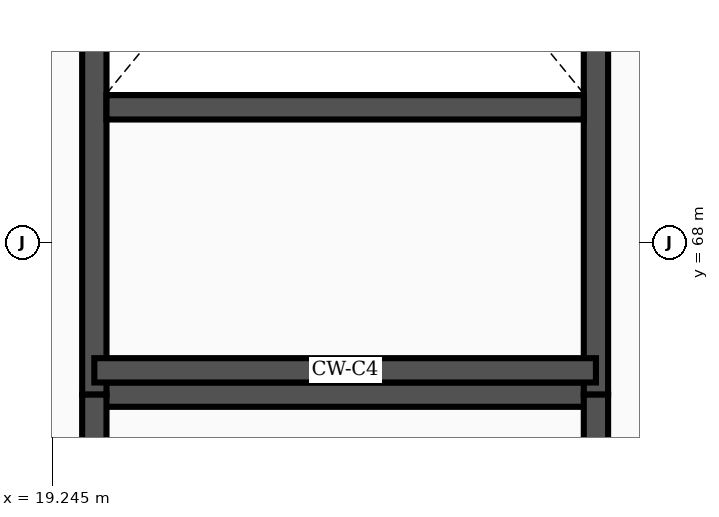
"""IFC4 building model, lengths in metres.
Left out: names, types, materials, properties, quantities, classifications, styles, units other than length and angle.
Written with IfcOpenShell. Run it as: python <this file> out.ifc"""

import sys

from ifc_helpers import new_model, si_unit, direction, frame, frame_2d, origin, place, context, subcontext, project, spatial, rectangle, extrude, element, save


model = new_model("IFC4")
c1 = context("Model", 3, precision=1e-05, world=origin(), true_north=direction((0.0, 1.0)))
c2 = subcontext(c1, "Body", "Model", "MODEL_VIEW")
j1 = project(units=[si_unit("LENGTHUNIT", "METRE"), si_unit("PLANEANGLEUNIT", "RADIAN")], contexts=[c1])
p1 = place(None, origin())
s1 = spatial("IfcSite", under=j1, at=p1, CompositionType="ELEMENT")
p2 = place(p1, origin())
s2 = spatial("IfcBuilding", under=s1, at=p2, CompositionType="ELEMENT")
p3 = place(p2, frame((0.0, 0.0, 6.0)))
s3 = spatial("IfcBuildingStorey", under=s2, at=p3, CompositionType="ELEMENT", Elevation=6.0)
p4 = place(p3, frame((19.8, 66.0, 0.0), z_axis=(0.0, 0.0, 1.0), x_axis=(1.0, 0.0, 0.0)))
e1 = element("IfcWall", 1, at=p4, inside=s3, PredefinedType="SHEAR", context=c2, shape_type="SweptSolid", body=[
    extrude(rectangle(XDim=6.6, YDim=0.32, at=frame_2d((3.3, 0.0))), origin(), (0.0, 0.0, 1.0), 5.15),
])
p5 = place(p3, frame((19.8, 66.0, 0.0), z_axis=(0.0, 0.0, 1.0), x_axis=(0.0, 1.0, 0.0)))
e2 = element("IfcWall", 2, at=p5, inside=s3, PredefinedType="SHEAR", context=c2, shape_type="SweptSolid", body=[
    extrude(rectangle(XDim=14.6, YDim=0.32, at=frame_2d((7.3, 0.0))), origin(), (0.0, 0.0, 1.0), 5.15),
])
p6 = place(p5, frame((11.65, 0.0, 0.0)))
e3 = element("IfcOpeningElement", 3, at=p6, cuts=e2, PredefinedType="OPENING", context=c2, shape_type="SweptSolid", body=[
    extrude(rectangle(XDim=2.4, YDim=2.25, at=frame_2d((1.2, 1.125))), frame((0.0, 0.172, 0.0), z_axis=(0.0, -1.0, 0.0), x_axis=(1.0, 0.0, 0.0)), (0.0, 0.0, 1.0), 0.344),
])
p7 = place(p3, frame((26.4, 66.0, 0.0), z_axis=(0.0, 0.0, 1.0), x_axis=(0.0, 1.0, 0.0)))
e4 = element("IfcWall", 4, at=p7, inside=s3, PredefinedType="SHEAR", context=c2, shape_type="SweptSolid", body=[
    extrude(rectangle(XDim=14.6, YDim=0.32, at=frame_2d((7.3, 0.0))), origin(), (0.0, 0.0, 1.0), 5.15),
])
p8 = place(p3, frame((19.96, 69.78, 0.0), z_axis=(0.0, 0.0, 1.0), x_axis=(1.0, 0.0, 0.0)))
e5 = element("IfcWall", 5, at=p8, inside=s3, PredefinedType="SHEAR", context=c2, shape_type="SweptSolid", body=[
    extrude(rectangle(XDim=6.28, YDim=0.32, at=frame_2d((3.14, 0.0))), origin(), (0.0, 0.0, 1.0), 5.15),
])
p9 = place(p3, frame((19.8, 66.32, 0.0), z_axis=(0.0, 0.0, 1.0), x_axis=(1.0, 0.0, 0.0)))
e6 = element("IfcWall", 6, at=p9, inside=s3, PredefinedType="SHEAR", context=c2, shape_type="SweptSolid", body=[
    extrude(rectangle(XDim=6.6, YDim=0.32, at=frame_2d((3.3, 0.0))), origin(), (0.0, 0.0, 1.0), 5.15),
])
p10 = place(p3, frame((19.8, 54.0, 0.0), z_axis=(0.0, 0.0, 1.0), x_axis=(0.0, 1.0, 0.0)))
e7 = element("IfcWall", 7, at=p10, inside=s3, PredefinedType="SHEAR", context=c2, shape_type="SweptSolid", body=[
    extrude(rectangle(XDim=12.0, YDim=0.32, at=frame_2d((6.0, 0.0))), origin(), (0.0, 0.0, 1.0), 5.15),
])
p11 = place(p10, frame((0.55, 0.0, 0.0)))
e8 = element("IfcOpeningElement", 8, at=p11, cuts=e7, PredefinedType="OPENING", context=c2, shape_type="SweptSolid", body=[
    extrude(rectangle(XDim=2.4, YDim=2.25, at=frame_2d((1.2, 1.125))), frame((0.0, 0.172, 0.0), z_axis=(0.0, -1.0, 0.0), x_axis=(1.0, 0.0, 0.0)), (0.0, 0.0, 1.0), 0.344),
])
p12 = place(p3, frame((26.4, 54.0, 0.0), z_axis=(0.0, 0.0, 1.0), x_axis=(0.0, 1.0, 0.0)))
e9 = element("IfcWall", 9, at=p12, inside=s3, PredefinedType="SHEAR", context=c2, shape_type="SweptSolid", body=[
    extrude(rectangle(XDim=12.0, YDim=0.32, at=frame_2d((6.0, 0.0))), origin(), (0.0, 0.0, 1.0), 5.15),
])
save(model, sys.argv[1])
